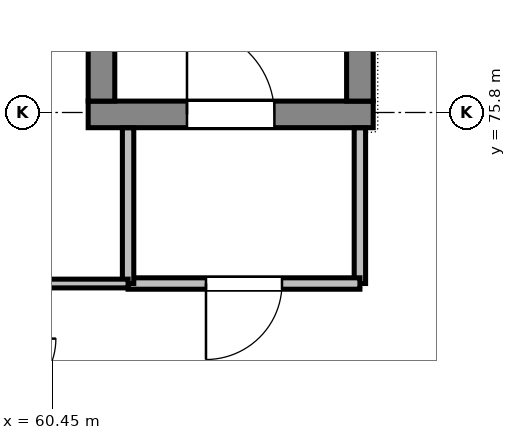
"""IFC4 building model, lengths in metres.
Left out: names, types, materials, properties, quantities, classifications, styles, units other than length and angle.
Written with IfcOpenShell. Run it as: python <this file> out.ifc"""

import sys

from ifc_helpers import new_model, si_unit, direction, frame, frame_2d, origin, place, context, subcontext, project, spatial, rectangle, extrude, element, fill, save


model = new_model("IFC4")
c1 = context("Model", 3, precision=1e-05, world=origin(), true_north=direction((0.0, 1.0)))
c2 = subcontext(c1, "Body", "Model", "MODEL_VIEW")
j1 = project(units=[si_unit("LENGTHUNIT", "METRE"), si_unit("PLANEANGLEUNIT", "RADIAN")], contexts=[c1])
p1 = place(None, origin())
s1 = spatial("IfcSite", under=j1, at=p1, CompositionType="ELEMENT")
p2 = place(p1, origin())
s2 = spatial("IfcBuilding", under=s1, at=p2, CompositionType="ELEMENT")
p3 = place(p2, frame((0.0, 0.0, 5.4)))
s3 = spatial("IfcBuildingStorey", under=s2, at=p3, CompositionType="ELEMENT", Elevation=5.4)
p4 = place(p3, frame((60.925, 75.775, 0.0), z_axis=(0.0, 0.0, 1.0), x_axis=(1.0, 0.0, 0.0)))
e1 = element("IfcWall", 1, at=p4, inside=s3, PredefinedType="SHEAR", context=c2, shape_type="SweptSolid", body=[
    extrude(rectangle(XDim=3.75, YDim=0.35, at=frame_2d((1.875, 0.0))), origin(), (0.0, 0.0, 1.0), 4.8),
])
p5 = place(p4, frame((1.3, 0.0, 0.0)))
e2 = element("IfcOpeningElement", 2, at=p5, cuts=e1, PredefinedType="OPENING", context=c2, shape_type="SweptSolid", body=[
    extrude(rectangle(XDim=1.15, YDim=2.15, at=frame_2d((0.575, 1.075))), frame((0.0, 0.185, 0.0), z_axis=(0.0, -1.0, 0.0), x_axis=(1.0, 0.0, 0.0)), (0.0, 0.0, 1.0), 0.37),
])
for number, where, z_axis, x_axis in (
    (3, (61.1, 75.95, 0.0), (0.0, 0.0, 1.0), (0.0, 1.0, 0.0)),
    (4, (64.5, 75.95, 0.0), (0.0, 0.0, 1.0), (0.0, 1.0, 0.0)),
):
    element("IfcWall", number, at=place(p3, frame(where, z_axis=z_axis, x_axis=x_axis)), inside=s3, PredefinedType="SHEAR", context=c2, shape_type="SweptSolid", body=[
        extrude(rectangle(XDim=7.275, YDim=0.35, at=frame_2d((3.638, 0.0))), origin(), (0.0, 0.0, 1.0), 4.8),
    ])
p6 = place(p3, frame((64.5, 75.598, 0.0), z_axis=(0.0, 0.0, 1.0), x_axis=(0.0, -1.0, 0.0)))
e5 = element("IfcWall", 5, at=p6, inside=s3, PredefinedType="PARTITIONING", context=c2, shape_type="SweptSolid", body=[
    extrude(rectangle(XDim=2.048, YDim=0.15, at=frame_2d((1.024, 0.0))), origin(), (0.0, 0.0, 1.0), 4.135),
])
p7 = place(p3, frame((64.5, 73.55, 0.0), z_axis=(0.0, 0.0, 1.0), x_axis=(-1.0, 0.0, 0.0)))
e6 = element("IfcWall", 6, at=p7, inside=s3, PredefinedType="PARTITIONING", context=c2, shape_type="SweptSolid", body=[
    extrude(rectangle(XDim=3.05, YDim=0.15, at=frame_2d((1.525, 0.0))), origin(), (0.0, 0.0, 1.0), 4.285),
])
p8 = place(p7, frame((1.025, 0.0, 0.0)))
e7 = element("IfcOpeningElement", 7, at=p8, cuts=e6, PredefinedType="OPENING", context=c2, shape_type="SweptSolid", body=[
    extrude(rectangle(XDim=1.0, YDim=2.1, at=frame_2d((0.5, 1.05))), frame((0.0, 0.085, 0.0), z_axis=(0.0, -1.0, 0.0), x_axis=(1.0, 0.0, 0.0)), (0.0, 0.0, 1.0), 0.17),
])
p9 = place(p3, frame((61.45, 73.55, 0.0), z_axis=(0.0, 0.0, 1.0), x_axis=(0.0, 1.0, 0.0)))
e8 = element("IfcWall", 8, at=p9, inside=s3, PredefinedType="PARTITIONING", context=c2, shape_type="SweptSolid", body=[
    extrude(rectangle(XDim=2.048, YDim=0.15, at=frame_2d((1.024, 0.0))), origin(), (0.0, 0.0, 1.0), 4.135),
])
p10 = place(p3, frame((61.45, 73.55, 0.0), z_axis=(0.0, 0.0, 1.0), x_axis=(-1.0, 0.0, 0.0)))
e9 = element("IfcWall", 9, at=p10, inside=s3, PredefinedType="PARTITIONING", context=c2, shape_type="SweptSolid", body=[
    extrude(rectangle(XDim=1.85, YDim=0.115, at=frame_2d((0.925, 0.0))), origin(), (0.0, 0.0, 1.0), 3.935),
])
p11 = place(p5, origin())
e10 = element("IfcDoor", 10, at=p11, inside=s3, OperationType="SINGLE_SWING_LEFT", PredefinedType="DOOR", context=c2, shape_type="SweptSolid", body=[
    extrude(rectangle(XDim=1.15, YDim=2.15, at=frame_2d((0.575, 1.075))), frame((0.0, 0.025, 0.0), z_axis=(0.0, -1.0, 0.0), x_axis=(1.0, 0.0, 0.0)), (0.0, 0.0, 1.0), 0.05),
])
fill(e2, e10)
p12 = place(p8, origin())
e11 = element("IfcDoor", 11, at=p12, inside=s3, OperationType="SINGLE_SWING_RIGHT", PredefinedType="DOOR", context=c2, shape_type="SweptSolid", body=[
    extrude(rectangle(XDim=1.0, YDim=2.1, at=frame_2d((0.5, 1.05))), frame((0.0, 0.025, 0.0), z_axis=(0.0, -1.0, 0.0), x_axis=(1.0, 0.0, 0.0)), (0.0, 0.0, 1.0), 0.05),
])
fill(e7, e11)
save(model, sys.argv[1])
